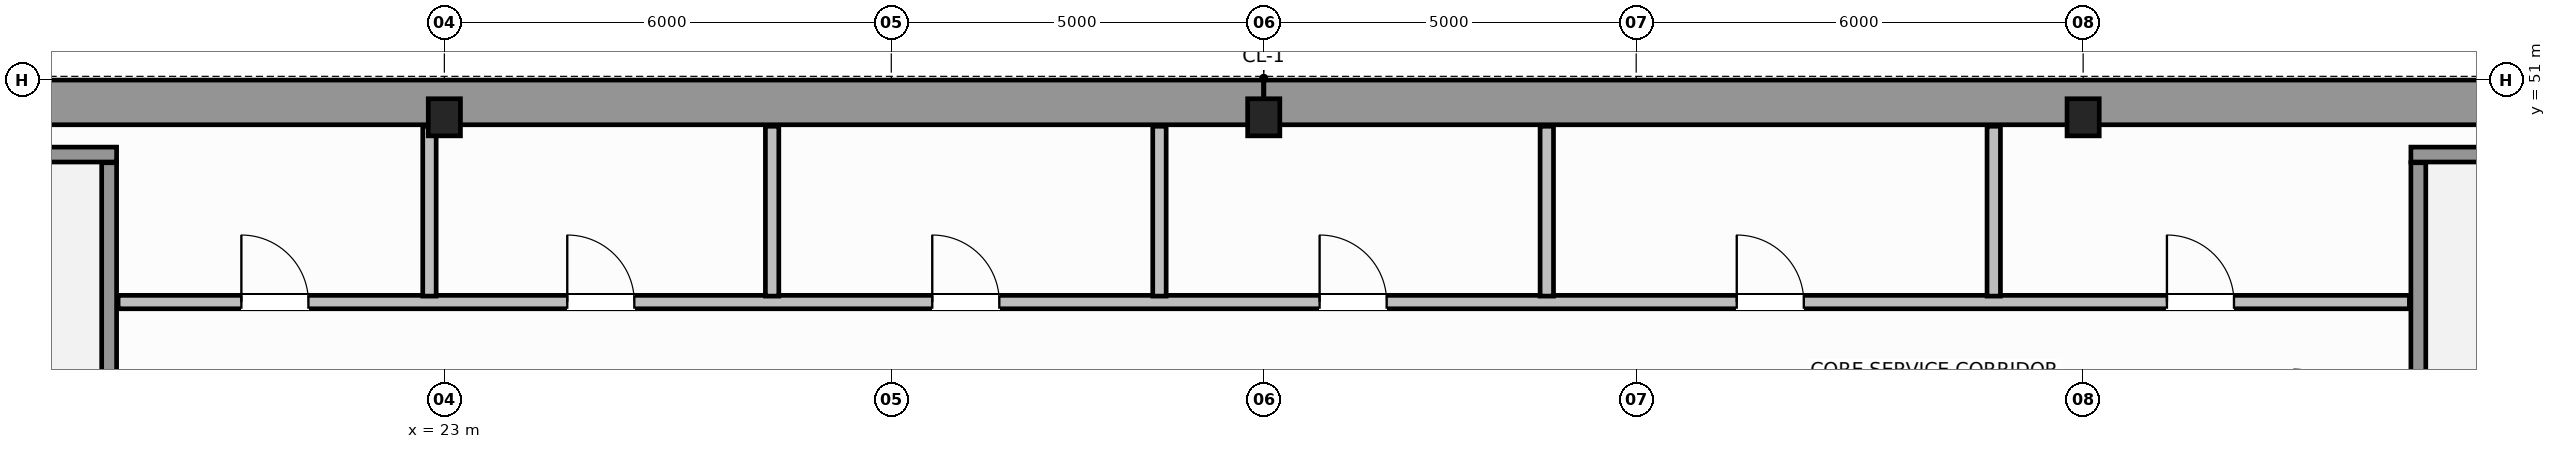
"""IFC4 building model, lengths in metres.
Left out: names, types, materials, properties, quantities, classifications, styles, units other than length and angle.
Written with IfcOpenShell. Run it as: python <this file> out.ifc"""

import sys

from ifc_helpers import new_model, si_unit, direction, frame, frame_2d, origin, origin_2d, place, context, subcontext, project, spatial, rectangle, i_section, extrude, source, transform, mapped, element, fill, save


model = new_model("IFC4")
c1 = context("Model", 3, precision=1e-05, world=origin(), true_north=direction((0.0, 1.0)))
c2 = subcontext(c1, "Body", "Model", "MODEL_VIEW")
j1 = project(units=[si_unit("LENGTHUNIT", "METRE"), si_unit("PLANEANGLEUNIT", "RADIAN")], contexts=[c1])
p1 = place(None, origin())
s1 = spatial("IfcSite", under=j1, at=p1, CompositionType="ELEMENT")
p2 = place(p1, origin())
s2 = spatial("IfcBuilding", under=s1, at=p2, CompositionType="ELEMENT")
p3 = place(p2, frame((0.0, 0.0, 203.2)))
s3 = spatial("IfcBuildingStorey", under=s2, at=p3, CompositionType="ELEMENT", Elevation=203.2)
m1 = source(origin(), c2, "Body", "SweptSolid", [
    extrude(i_section(OverallWidth=0.432, OverallDepth=0.498, WebThickness=0.055, FlangeThickness=0.068, FilletRadius=0.015, at=origin_2d()), origin(), (0.0, 0.0, 1.0), 3.8),
])
for number, where, z_axis, x_axis in (
    (1, (23.0, 50.5, 0.0), (0.0, 0.0, 1.0), (1.0, 0.0, 0.0)),
    (2, (34.0, 50.5, 0.0), (0.0, 0.0, 1.0), (1.0, 0.0, 0.0)),
    (3, (45.0, 50.5, 0.0), (0.0, 0.0, 1.0), (1.0, 0.0, 0.0)),
):
    element("IfcColumn", number, at=place(p3, frame(where, z_axis=z_axis, x_axis=x_axis)), inside=s3, PredefinedType="COLUMN", context=c2, shape_type="MappedRepresentation", body=[
        mapped(m1, transform((0.0, 0.0, 0.0), scale=1.0)),
    ])
for number, where, z_axis, x_axis in (
    (4, (14.304, 50.7, 0.0), (0.0, 0.0, 1.0), (1.0, 0.0, 0.0)),
    (5, (34.002, 50.7, 0.0), (0.0, 0.0, 1.0), (1.0, 0.0, 0.0)),
):
    element("IfcWall", number, at=place(p3, frame(where, z_axis=z_axis, x_axis=x_axis)), inside=s3, PredefinedType="SHEAR", context=c2, shape_type="SweptSolid", body=[
        extrude(rectangle(XDim=19.694, YDim=0.6, at=frame_2d((9.847, 0.0))), origin(), (0.0, 0.0, 1.0), 3.8),
    ])
p4 = place(p3, frame((14.3, 50.0, 0.0), z_axis=(0.0, 0.0, 1.0), x_axis=(1.0, 0.0, 0.0)))
e6 = element("IfcWall", 6, at=p4, inside=s3, PredefinedType="SOLIDWALL", context=c2, shape_type="SweptSolid", body=[
    extrude(rectangle(XDim=4.3, YDim=0.2, at=frame_2d((2.15, 0.0))), origin(), (0.0, 0.0, 1.0), 3.8),
])
p5 = place(p3, frame((18.5, 39.96, 0.0), z_axis=(0.0, 0.0, 1.0), x_axis=(0.0, 1.0, 0.0)))
e7 = element("IfcWall", 7, at=p5, inside=s3, PredefinedType="SOLIDWALL", context=c2, shape_type="SweptSolid", body=[
    extrude(rectangle(XDim=9.93, YDim=0.2, at=frame_2d((4.965, 0.0))), origin(), (0.0, 0.0, 1.0), 3.8),
])
p6 = place(p3, frame((49.4, 50.0, 0.0), z_axis=(0.0, 0.0, 1.0), x_axis=(1.0, 0.0, 0.0)))
e8 = element("IfcWall", 8, at=p6, inside=s3, PredefinedType="SOLIDWALL", context=c2, shape_type="SweptSolid", body=[
    extrude(rectangle(XDim=4.3, YDim=0.2, at=frame_2d((2.15, 0.0))), origin(), (0.0, 0.0, 1.0), 3.8),
])
p7 = place(p3, frame((49.5, 39.96, 0.0), z_axis=(0.0, 0.0, 1.0), x_axis=(0.0, 1.0, 0.0)))
e9 = element("IfcWall", 9, at=p7, inside=s3, PredefinedType="SOLIDWALL", context=c2, shape_type="SweptSolid", body=[
    extrude(rectangle(XDim=9.93, YDim=0.2, at=frame_2d((4.965, 0.0))), origin(), (0.0, 0.0, 1.0), 3.8),
])
p8 = place(p3, frame((18.62, 48.02, 0.0), z_axis=(0.0, 0.0, 1.0), x_axis=(1.0, 0.0, 0.0)))
e10 = element("IfcWall", 10, at=p8, inside=s3, PredefinedType="PLUMBINGWALL", context=c2, shape_type="SweptSolid", body=[
    extrude(rectangle(XDim=30.76, YDim=0.18, at=frame_2d((15.38, 0.0))), origin(), (0.0, 0.0, 1.0), 3.58),
])
p9 = place(p8, frame((1.655, 0.0, 0.0)))
e11 = element("IfcOpeningElement", 11, at=p9, cuts=e10, PredefinedType="OPENING", context=c2, shape_type="SweptSolid", body=[
    extrude(rectangle(XDim=0.9, YDim=2.15, at=frame_2d((0.45, 1.075))), frame((0.0, 0.1, 0.0), z_axis=(0.0, -1.0, 0.0), x_axis=(1.0, 0.0, 0.0)), (0.0, 0.0, 1.0), 0.2),
])
p10 = place(p8, frame((6.03, 0.0, 0.0)))
e12 = element("IfcOpeningElement", 12, at=p10, cuts=e10, PredefinedType="OPENING", context=c2, shape_type="SweptSolid", body=[
    extrude(rectangle(XDim=0.9, YDim=2.15, at=frame_2d((0.45, 1.075))), frame((0.0, 0.1, 0.0), z_axis=(0.0, -1.0, 0.0), x_axis=(1.0, 0.0, 0.0)), (0.0, 0.0, 1.0), 0.2),
])
p11 = place(p8, frame((10.93, 0.0, 0.0)))
e13 = element("IfcOpeningElement", 13, at=p11, cuts=e10, PredefinedType="OPENING", context=c2, shape_type="SweptSolid", body=[
    extrude(rectangle(XDim=0.9, YDim=2.15, at=frame_2d((0.45, 1.075))), frame((0.0, 0.1, 0.0), z_axis=(0.0, -1.0, 0.0), x_axis=(1.0, 0.0, 0.0)), (0.0, 0.0, 1.0), 0.2),
])
p12 = place(p8, frame((16.13, 0.0, 0.0)))
e14 = element("IfcOpeningElement", 14, at=p12, cuts=e10, PredefinedType="OPENING", context=c2, shape_type="SweptSolid", body=[
    extrude(rectangle(XDim=0.9, YDim=2.15, at=frame_2d((0.45, 1.075))), frame((0.0, 0.1, 0.0), z_axis=(0.0, -1.0, 0.0), x_axis=(1.0, 0.0, 0.0)), (0.0, 0.0, 1.0), 0.2),
])
p13 = place(p8, frame((21.73, 0.0, 0.0)))
e15 = element("IfcOpeningElement", 15, at=p13, cuts=e10, PredefinedType="OPENING", context=c2, shape_type="SweptSolid", body=[
    extrude(rectangle(XDim=0.9, YDim=2.15, at=frame_2d((0.45, 1.075))), frame((0.0, 0.1, 0.0), z_axis=(0.0, -1.0, 0.0), x_axis=(1.0, 0.0, 0.0)), (0.0, 0.0, 1.0), 0.2),
])
p14 = place(p8, frame((27.505, 0.0, 0.0)))
e16 = element("IfcOpeningElement", 16, at=p14, cuts=e10, PredefinedType="OPENING", context=c2, shape_type="SweptSolid", body=[
    extrude(rectangle(XDim=0.9, YDim=2.15, at=frame_2d((0.45, 1.075))), frame((0.0, 0.1, 0.0), z_axis=(0.0, -1.0, 0.0), x_axis=(1.0, 0.0, 0.0)), (0.0, 0.0, 1.0), 0.2),
])
p15 = place(p3, frame((22.8, 48.1, 0.0), z_axis=(0.0, 0.0, 1.0), x_axis=(0.0, 1.0, 0.0)))
e17 = element("IfcWall", 17, at=p15, inside=s3, PredefinedType="PLUMBINGWALL", context=c2, shape_type="SweptSolid", body=[
    extrude(rectangle(XDim=2.28, YDim=0.18, at=frame_2d((1.14, 0.0))), origin(), (0.0, 0.0, 1.0), 2.37),
])
for number, where, z_axis, x_axis in (
    (18, (27.4, 48.1, 0.0), (0.0, 0.0, 1.0), (0.0, 1.0, 0.0)),
    (19, (32.6, 48.1, 0.0), (0.0, 0.0, 1.0), (0.0, 1.0, 0.0)),
    (20, (37.8, 48.1, 0.0), (0.0, 0.0, 1.0), (0.0, 1.0, 0.0)),
    (21, (43.8, 48.1, 0.0), (0.0, 0.0, 1.0), (0.0, 1.0, 0.0)),
):
    element("IfcWall", number, at=place(p3, frame(where, z_axis=z_axis, x_axis=x_axis)), inside=s3, PredefinedType="PLUMBINGWALL", context=c2, shape_type="SweptSolid", body=[
        extrude(rectangle(XDim=2.28, YDim=0.18, at=frame_2d((1.14, 0.0))), origin(), (0.0, 0.0, 1.0), 3.58),
    ])
m2 = source(origin(), c2, "Body", "SweptSolid", [
    extrude(rectangle(XDim=0.9, YDim=2.15, at=frame_2d((0.45, 1.075))), frame((0.0, 0.025, 0.0), z_axis=(0.0, -1.0, 0.0), x_axis=(1.0, 0.0, 0.0)), (0.0, 0.0, 1.0), 0.05),
])
p16 = place(p9, origin())
e22 = element("IfcDoor", 22, at=p16, inside=s3, OperationType="SINGLE_SWING_LEFT", PredefinedType="DOOR", context=c2, shape_type="MappedRepresentation", body=[
    mapped(m2, transform((0.0, 0.0, 0.0), scale=1.0)),
])
fill(e11, e22)
p17 = place(p10, origin())
e23 = element("IfcDoor", 23, at=p17, inside=s3, OperationType="SINGLE_SWING_RIGHT", PredefinedType="DOOR", context=c2, shape_type="MappedRepresentation", body=[
    mapped(m2, transform((0.0, 0.0, 0.0), scale=1.0)),
])
fill(e12, e23)
p18 = place(p11, origin())
e24 = element("IfcDoor", 24, at=p18, inside=s3, OperationType="SINGLE_SWING_LEFT", PredefinedType="DOOR", context=c2, shape_type="MappedRepresentation", body=[
    mapped(m2, transform((0.0, 0.0, 0.0), scale=1.0)),
])
fill(e13, e24)
p19 = place(p12, origin())
e25 = element("IfcDoor", 25, at=p19, inside=s3, OperationType="SINGLE_SWING_RIGHT", PredefinedType="DOOR", context=c2, shape_type="MappedRepresentation", body=[
    mapped(m2, transform((0.0, 0.0, 0.0), scale=1.0)),
])
fill(e14, e25)
p20 = place(p13, origin())
e26 = element("IfcDoor", 26, at=p20, inside=s3, OperationType="SINGLE_SWING_LEFT", PredefinedType="DOOR", context=c2, shape_type="MappedRepresentation", body=[
    mapped(m2, transform((0.0, 0.0, 0.0), scale=1.0)),
])
fill(e15, e26)
p21 = place(p14, origin())
e27 = element("IfcDoor", 27, at=p21, inside=s3, OperationType="SINGLE_SWING_RIGHT", PredefinedType="DOOR", context=c2, shape_type="MappedRepresentation", body=[
    mapped(m2, transform((0.0, 0.0, 0.0), scale=1.0)),
])
fill(e16, e27)
save(model, sys.argv[1])
